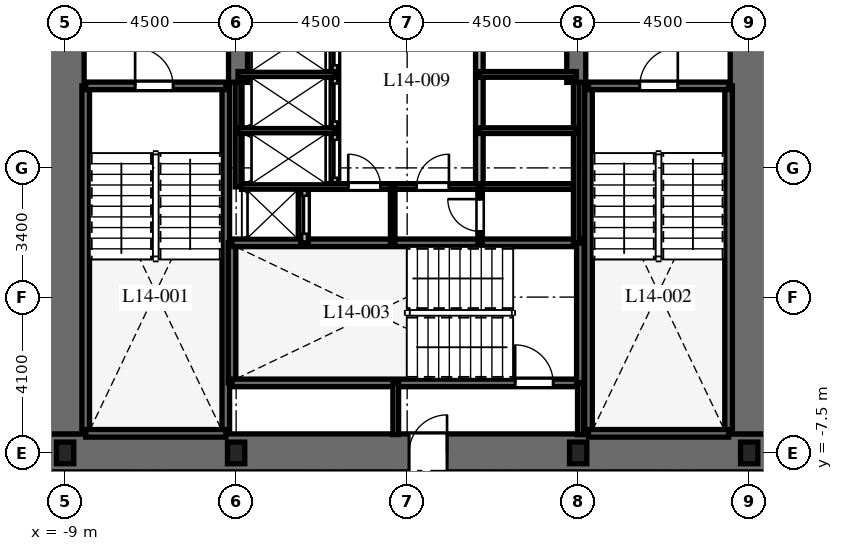
"""IFC4 building model, lengths in metres.
Left out: names, types, materials, properties, quantities, classifications, styles, units other than length and angle.
Written with IfcOpenShell. Run it as: python <this file> out.ifc"""

import sys

from ifc_helpers import new_model, si_unit, direction, frame, frame_2d, origin, origin_2d, place, context, subcontext, project, spatial, rectangle, i_section, extrude, element, fill, save


model = new_model("IFC4")
c1 = context("Model", 3, precision=1e-05, world=origin(), true_north=direction((0.0, 1.0)))
c2 = subcontext(c1, "Body", "Model", "MODEL_VIEW")
j1 = project(units=[si_unit("LENGTHUNIT", "METRE"), si_unit("PLANEANGLEUNIT", "RADIAN")], contexts=[c1])
p1 = place(None, origin())
s1 = spatial("IfcSite", under=j1, at=p1, CompositionType="ELEMENT")
p2 = place(p1, origin())
s2 = spatial("IfcBuilding", under=s1, at=p2, CompositionType="ELEMENT")
p3 = place(p2, frame((0.0, 0.0, 63.8)))
s3 = spatial("IfcBuildingStorey", under=s2, at=p3, CompositionType="ELEMENT", Elevation=63.8)
p4 = place(p3, frame((-9.5, -7.5, 0.0), z_axis=(0.0, 0.0, 1.0), x_axis=(1.0, 0.0, 0.0)))
e1 = element("IfcWall", 1, at=p4, inside=s3, PredefinedType="SHEAR", context=c2, shape_type="SweptSolid", body=[
    extrude(rectangle(XDim=19.0, YDim=1.0, at=frame_2d((9.5, 0.0))), origin(), (0.0, 0.0, 1.0), 3.7),
])
p5 = place(p4, frame((9.55, 0.0, 0.0)))
e2 = element("IfcOpeningElement", 2, at=p5, cuts=e1, PredefinedType="OPENING", context=c2, shape_type="SweptSolid", body=[
    extrude(rectangle(XDim=1.0, YDim=2.15, at=frame_2d((0.5, 1.075))), frame((0.0, 0.51, 0.0), z_axis=(0.0, -1.0, 0.0), x_axis=(1.0, 0.0, 0.0)), (0.0, 0.0, 1.0), 1.02),
])
p6 = place(p3, frame((-9.0, -7.0, 0.0), z_axis=(0.0, 0.0, 1.0), x_axis=(0.0, 1.0, 0.0)))
e3 = element("IfcWall", 3, at=p6, inside=s3, PredefinedType="SHEAR", context=c2, shape_type="SweptSolid", body=[
    extrude(rectangle(XDim=14.0, YDim=1.0, at=frame_2d((7.0, 0.0))), origin(), (0.0, 0.0, 1.0), 3.7),
])
p7 = place(p6, frame((10.125, 0.0, 0.0)))
e4 = element("IfcOpeningElement", 4, at=p7, cuts=e3, PredefinedType="OPENING", context=c2, shape_type="SweptSolid", body=[
    extrude(rectangle(XDim=1.05, YDim=2.15, at=frame_2d((0.525, 1.075))), frame((0.0, 0.51, 0.0), z_axis=(0.0, -1.0, 0.0), x_axis=(1.0, 0.0, 0.0)), (0.0, 0.0, 1.0), 1.02),
])
p8 = place(p3, frame((9.0, -7.0, 0.0), z_axis=(0.0, 0.0, 1.0), x_axis=(0.0, 1.0, 0.0)))
e5 = element("IfcWall", 5, at=p8, inside=s3, PredefinedType="SHEAR", context=c2, shape_type="SweptSolid", body=[
    extrude(rectangle(XDim=14.0, YDim=1.0, at=frame_2d((7.0, 0.0))), origin(), (0.0, 0.0, 1.0), 3.7),
])
p9 = place(p8, frame((10.125, 0.0, 0.0)))
e6 = element("IfcOpeningElement", 6, at=p9, cuts=e5, PredefinedType="OPENING", context=c2, shape_type="SweptSolid", body=[
    extrude(rectangle(XDim=1.05, YDim=2.15, at=frame_2d((0.525, 1.075))), frame((0.0, 0.51, 0.0), z_axis=(0.0, -1.0, 0.0), x_axis=(1.0, 0.0, 0.0)), (0.0, 0.0, 1.0), 1.02),
])
for number, where, z_axis, x_axis in (
    (7, (-4.45, 2.25, 0.0), (0.0, 0.0, 1.0), (0.0, 1.0, 0.0)),
    (8, (4.45, 2.25, 0.0), (0.0, 0.0, 1.0), (0.0, 1.0, 0.0)),
):
    element("IfcWall", number, at=place(p3, frame(where, z_axis=z_axis, x_axis=x_axis)), inside=s3, PredefinedType="SHEAR", context=c2, shape_type="SweptSolid", body=[
        extrude(rectangle(XDim=4.75, YDim=0.5, at=frame_2d((2.375, 0.0))), origin(), (0.0, 0.0, 1.0), 3.7),
    ])
for number, where, z_axis, x_axis in (
    (9, (-8.458, -6.985, 0.0), (0.0, 0.0, 1.0), (0.0, 1.0, 0.0)),
    (10, (-4.772, -6.985, 0.0), (0.0, 0.0, 1.0), (0.0, 1.0, 0.0)),
):
    element("IfcWall", number, at=place(p3, frame(where, z_axis=z_axis, x_axis=x_axis)), inside=s3, PredefinedType="SHEAR", context=c2, shape_type="SweptSolid", body=[
        extrude(rectangle(XDim=9.143, YDim=0.2, at=frame_2d((4.572, 0.0))), origin(), (0.0, 0.0, 1.0), 3.7),
    ])
p10 = place(p3, frame((-8.458, -6.985, 0.0), z_axis=(0.0, 0.0, 1.0), x_axis=(1.0, 0.0, 0.0)))
e11 = element("IfcWall", 11, at=p10, inside=s3, PredefinedType="SHEAR", context=c2, shape_type="SweptSolid", body=[
    extrude(rectangle(XDim=3.686, YDim=0.2, at=frame_2d((1.843, 0.0))), origin(), (0.0, 0.0, 1.0), 3.7),
])
p11 = place(p3, frame((-8.458, 2.158, 0.0), z_axis=(0.0, 0.0, 1.0), x_axis=(1.0, 0.0, 0.0)))
e12 = element("IfcWall", 12, at=p11, inside=s3, PredefinedType="SHEAR", context=c2, shape_type="SweptSolid", body=[
    extrude(rectangle(XDim=3.686, YDim=0.2, at=frame_2d((1.843, 0.0))), origin(), (0.0, 0.0, 1.0), 3.7),
])
p12 = place(p11, frame((1.3, 0.0, 0.0)))
e13 = element("IfcOpeningElement", 13, at=p12, cuts=e12, PredefinedType="OPENING", context=c2, shape_type="SweptSolid", body=[
    extrude(rectangle(XDim=1.0, YDim=2.15, at=frame_2d((0.5, 1.075))), frame((0.0, 0.11, 0.0), z_axis=(0.0, -1.0, 0.0), x_axis=(1.0, 0.0, 0.0)), (0.0, 0.0, 1.0), 0.22),
])
for number, where, z_axis, x_axis in (
    (14, (4.772, -6.985, 0.0), (0.0, 0.0, 1.0), (0.0, 1.0, 0.0)),
    (15, (8.458, -6.985, 0.0), (0.0, 0.0, 1.0), (0.0, 1.0, 0.0)),
):
    element("IfcWall", number, at=place(p3, frame(where, z_axis=z_axis, x_axis=x_axis)), inside=s3, PredefinedType="SHEAR", context=c2, shape_type="SweptSolid", body=[
        extrude(rectangle(XDim=9.143, YDim=0.2, at=frame_2d((4.572, 0.0))), origin(), (0.0, 0.0, 1.0), 3.7),
    ])
p13 = place(p3, frame((4.772, -6.985, 0.0), z_axis=(0.0, 0.0, 1.0), x_axis=(1.0, 0.0, 0.0)))
e16 = element("IfcWall", 16, at=p13, inside=s3, PredefinedType="SHEAR", context=c2, shape_type="SweptSolid", body=[
    extrude(rectangle(XDim=3.686, YDim=0.2, at=frame_2d((1.843, 0.0))), origin(), (0.0, 0.0, 1.0), 3.7),
])
p14 = place(p3, frame((4.772, 2.158, 0.0), z_axis=(0.0, 0.0, 1.0), x_axis=(1.0, 0.0, 0.0)))
e17 = element("IfcWall", 17, at=p14, inside=s3, PredefinedType="SHEAR", context=c2, shape_type="SweptSolid", body=[
    extrude(rectangle(XDim=3.686, YDim=0.2, at=frame_2d((1.843, 0.0))), origin(), (0.0, 0.0, 1.0), 3.7),
])
p15 = place(p14, frame((1.35, 0.0, 0.0)))
e18 = element("IfcOpeningElement", 18, at=p15, cuts=e17, PredefinedType="OPENING", context=c2, shape_type="SweptSolid", body=[
    extrude(rectangle(XDim=1.0, YDim=2.15, at=frame_2d((0.5, 1.075))), frame((0.0, 0.11, 0.0), z_axis=(0.0, -1.0, 0.0), x_axis=(1.0, 0.0, 0.0)), (0.0, 0.0, 1.0), 0.22),
])
p16 = place(p3, frame((-4.608, -5.658, 0.0), z_axis=(0.0, 0.0, 1.0), x_axis=(0.0, 1.0, 0.0)))
e19 = element("IfcWall", 19, at=p16, inside=s3, PredefinedType="SHEAR", context=c2, shape_type="SweptSolid", body=[
    extrude(rectangle(XDim=3.686, YDim=0.2, at=frame_2d((1.843, 0.0))), origin(), (0.0, 0.0, 1.0), 3.7),
])
p17 = place(p3, frame((-4.608, -5.658, 0.0), z_axis=(0.0, 0.0, 1.0), x_axis=(1.0, 0.0, 0.0)))
e20 = element("IfcWall", 20, at=p17, inside=s3, PredefinedType="SHEAR", context=c2, shape_type="SweptSolid", body=[
    extrude(rectangle(XDim=9.166, YDim=0.2, at=frame_2d((4.583, 0.0))), origin(), (0.0, 0.0, 1.0), 3.7),
])
p18 = place(p17, frame((7.45, 0.0, 0.0)))
e21 = element("IfcOpeningElement", 21, at=p18, cuts=e20, PredefinedType="OPENING", context=c2, shape_type="SweptSolid", body=[
    extrude(rectangle(XDim=1.0, YDim=2.15, at=frame_2d((0.5, 1.075))), frame((0.0, 0.11, 0.0), z_axis=(0.0, -1.0, 0.0), x_axis=(1.0, 0.0, 0.0)), (0.0, 0.0, 1.0), 0.22),
])
p19 = place(p3, frame((-4.608, -1.972, 0.0), z_axis=(0.0, 0.0, 1.0), x_axis=(1.0, 0.0, 0.0)))
e22 = element("IfcWall", 22, at=p19, inside=s3, PredefinedType="SHEAR", context=c2, shape_type="SweptSolid", body=[
    extrude(rectangle(XDim=9.166, YDim=0.2, at=frame_2d((4.583, 0.0))), origin(), (0.0, 0.0, 1.0), 3.7),
])
p20 = place(p3, frame((4.558, -5.658, 0.0), z_axis=(0.0, 0.0, 1.0), x_axis=(0.0, 1.0, 0.0)))
e23 = element("IfcWall", 23, at=p20, inside=s3, PredefinedType="SHEAR", context=c2, shape_type="SweptSolid", body=[
    extrude(rectangle(XDim=3.686, YDim=0.2, at=frame_2d((1.843, 0.0))), origin(), (0.0, 0.0, 1.0), 3.7),
])
for number, where, z_axis, x_axis in (
    (24, (-9.0, -7.5, 0.0), (0.0, 0.0, 1.0), (1.0, 0.0, 0.0)),
    (25, (-4.5, -7.5, 0.0), (0.0, 0.0, 1.0), (1.0, 0.0, 0.0)),
    (26, (4.5, -7.5, 0.0), (0.0, 0.0, 1.0), (1.0, 0.0, 0.0)),
    (27, (9.0, -7.5, 0.0), (0.0, 0.0, 1.0), (1.0, 0.0, 0.0)),
):
    element("IfcColumn", number, at=place(p3, frame(where, z_axis=z_axis, x_axis=x_axis)), inside=s3, PredefinedType="COLUMN", context=c2, shape_type="SweptSolid", body=[
        extrude(i_section(OverallWidth=0.454, OverallDepth=0.569, WebThickness=0.078, FlangeThickness=0.125, at=origin_2d()), origin(), (0.0, 0.0, 1.0), 3.7),
    ])
for number, where, z_axis, x_axis in (
    (28, (-0.3, -7.02, 0.0), (0.0, 0.0, 1.0), (0.0, 1.0, 0.0)),
    (29, (4.558, -7.02, 0.0), (0.0, 0.0, 1.0), (0.0, 1.0, 0.0)),
):
    element("IfcWall", number, at=place(p3, frame(where, z_axis=z_axis, x_axis=x_axis)), inside=s3, PredefinedType="PARTITIONING", context=c2, shape_type="SweptSolid", body=[
        extrude(rectangle(XDim=1.362, YDim=0.15, at=frame_2d((0.681, 0.0))), origin(), (0.0, 0.0, 1.0), 3.4),
    ])
p21 = place(p3, frame((-2.7, -1.972, 0.0), z_axis=(0.0, 0.0, 1.0), x_axis=(0.0, 1.0, 0.0)))
e30 = element("IfcWall", 30, at=p21, inside=s3, PredefinedType="PARTITIONING", context=c2, shape_type="SweptSolid", body=[
    extrude(rectangle(XDim=1.472, YDim=0.2, at=frame_2d((0.736, 0.0))), origin(), (0.0, 0.0, 1.0), 3.4),
])
p22 = place(p21, frame((0.24, 0.0, 0.0)))
e31 = element("IfcOpeningElement", 31, at=p22, cuts=e30, PredefinedType="OPENING", context=c2, shape_type="SweptSolid", body=[
    extrude(rectangle(XDim=1.0, YDim=2.2, at=frame_2d((0.5, 1.1))), frame((0.0, 0.11, 0.0), z_axis=(0.0, -1.0, 0.0), x_axis=(1.0, 0.0, 0.0)), (0.0, 0.0, 1.0), 0.22),
])
p23 = place(p3, frame((-4.45, -0.5, 0.0), z_axis=(0.0, 0.0, 1.0), x_axis=(0.0, 1.0, 0.0)))
e32 = element("IfcWall", 32, at=p23, inside=s3, PredefinedType="PARTITIONING", context=c2, shape_type="SweptSolid", body=[
    extrude(rectangle(XDim=2.75, YDim=0.15, at=frame_2d((1.375, 0.0))), origin(), (0.0, 0.0, 1.0), 3.4),
])
p24 = place(p3, frame((4.45, -1.972, 0.0), z_axis=(0.0, 0.0, 1.0), x_axis=(0.0, 1.0, 0.0)))
e33 = element("IfcWall", 33, at=p24, inside=s3, PredefinedType="PARTITIONING", context=c2, shape_type="SweptSolid", body=[
    extrude(rectangle(XDim=4.222, YDim=0.15, at=frame_2d((2.111, 0.0))), origin(), (0.0, 0.0, 1.0), 3.4),
])
p25 = place(p3, frame((-1.9, -0.5, 0.0), z_axis=(0.0, 0.0, 1.0), x_axis=(0.0, 1.0, 0.0)))
e34 = element("IfcWall", 34, at=p25, inside=s3, PredefinedType="PARTITIONING", context=c2, shape_type="SweptSolid", body=[
    extrude(rectangle(XDim=4.44, YDim=0.2, at=frame_2d((2.22, 0.0))), origin(), (0.0, 0.0, 1.0), 3.4),
])
p26 = place(p25, frame((0.24, 0.0, 0.0)))
e35 = element("IfcOpeningElement", 35, at=p26, cuts=e34, PredefinedType="OPENING", context=c2, shape_type="SweptSolid", body=[
    extrude(rectangle(XDim=1.0, YDim=2.2, at=frame_2d((0.5, 1.1))), frame((0.0, 0.11, 0.0), z_axis=(0.0, -1.0, 0.0), x_axis=(1.0, 0.0, 0.0)), (0.0, 0.0, 1.0), 0.22),
])
p27 = place(p25, frame((1.72, 0.0, 0.0)))
e36 = element("IfcOpeningElement", 36, at=p27, cuts=e34, PredefinedType="OPENING", context=c2, shape_type="SweptSolid", body=[
    extrude(rectangle(XDim=1.0, YDim=2.2, at=frame_2d((0.5, 1.1))), frame((0.0, 0.11, 0.0), z_axis=(0.0, -1.0, 0.0), x_axis=(1.0, 0.0, 0.0)), (0.0, 0.0, 1.0), 0.22),
])
p28 = place(p25, frame((3.2, 0.0, 0.0)))
e37 = element("IfcOpeningElement", 37, at=p28, cuts=e34, PredefinedType="OPENING", context=c2, shape_type="SweptSolid", body=[
    extrude(rectangle(XDim=1.0, YDim=2.2, at=frame_2d((0.5, 1.1))), frame((0.0, 0.11, 0.0), z_axis=(0.0, -1.0, 0.0), x_axis=(1.0, 0.0, 0.0)), (0.0, 0.0, 1.0), 0.22),
])
for number, where, z_axis, x_axis in (
    (38, (-4.45, 0.98, 0.0), (0.0, 0.0, 1.0), (1.0, 0.0, 0.0)),
    (39, (-4.45, 2.46, 0.0), (0.0, 0.0, 1.0), (1.0, 0.0, 0.0)),
):
    element("IfcWall", number, at=place(p3, frame(where, z_axis=z_axis, x_axis=x_axis)), inside=s3, PredefinedType="PARTITIONING", context=c2, shape_type="SweptSolid", body=[
        extrude(rectangle(XDim=2.55, YDim=0.15, at=frame_2d((1.275, 0.0))), origin(), (0.0, 0.0, 1.0), 3.4),
    ])
p29 = place(p3, frame((1.9, -0.5, 0.0), z_axis=(0.0, 0.0, 1.0), x_axis=(0.0, 1.0, 0.0)))
e40 = element("IfcWall", 40, at=p29, inside=s3, PredefinedType="PARTITIONING", context=c2, shape_type="SweptSolid", body=[
    extrude(rectangle(XDim=4.44, YDim=0.2, at=frame_2d((2.22, 0.0))), origin(), (0.0, 0.0, 1.0), 3.4),
])
for number, where, z_axis, x_axis in (
    (41, (1.9, 0.98, 0.0), (0.0, 0.0, 1.0), (1.0, 0.0, 0.0)),
    (42, (1.9, 2.46, 0.0), (0.0, 0.0, 1.0), (1.0, 0.0, 0.0)),
):
    element("IfcWall", number, at=place(p3, frame(where, z_axis=z_axis, x_axis=x_axis)), inside=s3, PredefinedType="PARTITIONING", context=c2, shape_type="SweptSolid", body=[
        extrude(rectangle(XDim=2.55, YDim=0.15, at=frame_2d((1.275, 0.0))), origin(), (0.0, 0.0, 1.0), 3.4),
    ])
p30 = place(p3, frame((-4.36, -0.49, 0.0), z_axis=(0.0, 0.0, 1.0), x_axis=(1.0, 0.0, 0.0)))
e43 = element("IfcWall", 43, at=p30, inside=s3, PredefinedType="PARTITIONING", context=c2, shape_type="SweptSolid", body=[
    extrude(rectangle(XDim=8.72, YDim=0.15, at=frame_2d((4.36, 0.0))), origin(), (0.0, 0.0, 1.0), 3.4),
])
p31 = place(p30, frame((2.81, 0.0, 0.0)))
e44 = element("IfcOpeningElement", 44, at=p31, cuts=e43, PredefinedType="OPENING", context=c2, shape_type="SweptSolid", body=[
    extrude(rectangle(XDim=0.85, YDim=2.03, at=frame_2d((0.425, 1.015))), frame((0.0, 0.085, 0.0), z_axis=(0.0, -1.0, 0.0), x_axis=(1.0, 0.0, 0.0)), (0.0, 0.0, 1.0), 0.17),
])
p32 = place(p30, frame((4.61, 0.0, 0.0)))
e45 = element("IfcOpeningElement", 45, at=p32, cuts=e43, PredefinedType="OPENING", context=c2, shape_type="SweptSolid", body=[
    extrude(rectangle(XDim=0.85, YDim=2.03, at=frame_2d((0.425, 1.015))), frame((0.0, 0.085, 0.0), z_axis=(0.0, -1.0, 0.0), x_axis=(1.0, 0.0, 0.0)), (0.0, 0.0, 1.0), 0.17),
])
p33 = place(p3, frame((-0.38, -1.972, 0.0), z_axis=(0.0, 0.0, 1.0), x_axis=(0.0, 1.0, 0.0)))
e46 = element("IfcWall", 46, at=p33, inside=s3, PredefinedType="PARTITIONING", context=c2, shape_type="SweptSolid", body=[
    extrude(rectangle(XDim=1.472, YDim=0.12, at=frame_2d((0.736, 0.0))), origin(), (0.0, 0.0, 1.0), 3.4),
])
p34 = place(p3, frame((1.92, -1.972, 0.0), z_axis=(0.0, 0.0, 1.0), x_axis=(0.0, 1.0, 0.0)))
e47 = element("IfcWall", 47, at=p34, inside=s3, PredefinedType="PARTITIONING", context=c2, shape_type="SweptSolid", body=[
    extrude(rectangle(XDim=1.472, YDim=0.12, at=frame_2d((0.736, 0.0))), origin(), (0.0, 0.0, 1.0), 3.4),
])
p35 = place(p34, frame((0.3, 0.0, 0.0)))
e48 = element("IfcOpeningElement", 48, at=p35, cuts=e47, PredefinedType="OPENING", context=c2, shape_type="SweptSolid", body=[
    extrude(rectangle(XDim=0.85, YDim=2.03, at=frame_2d((0.425, 1.015))), frame((0.0, 0.07, 0.0), z_axis=(0.0, -1.0, 0.0), x_axis=(1.0, 0.0, 0.0)), (0.0, 0.0, 1.0), 0.14),
])
p36 = place(p12, origin())
e49 = element("IfcDoor", 49, at=p36, inside=s3, OperationType="SINGLE_SWING_LEFT", PredefinedType="DOOR", context=c2, shape_type="SweptSolid", body=[
    extrude(rectangle(XDim=1.0, YDim=2.15, at=frame_2d((0.5, 1.075))), frame((0.0, 0.025, 0.0), z_axis=(0.0, -1.0, 0.0), x_axis=(1.0, 0.0, 0.0)), (0.0, 0.0, 1.0), 0.05),
])
fill(e13, e49)
p37 = place(p15, origin())
e50 = element("IfcDoor", 50, at=p37, inside=s3, OperationType="SINGLE_SWING_RIGHT", PredefinedType="DOOR", context=c2, shape_type="SweptSolid", body=[
    extrude(rectangle(XDim=1.0, YDim=2.15, at=frame_2d((0.5, 1.075))), frame((0.0, 0.025, 0.0), z_axis=(0.0, -1.0, 0.0), x_axis=(1.0, 0.0, 0.0)), (0.0, 0.0, 1.0), 0.05),
])
fill(e18, e50)
p38 = place(p18, origin())
e51 = element("IfcDoor", 51, at=p38, inside=s3, OperationType="SINGLE_SWING_LEFT", PredefinedType="DOOR", context=c2, shape_type="SweptSolid", body=[
    extrude(rectangle(XDim=1.0, YDim=2.15, at=frame_2d((0.5, 1.075))), frame((0.0, 0.025, 0.0), z_axis=(0.0, -1.0, 0.0), x_axis=(1.0, 0.0, 0.0)), (0.0, 0.0, 1.0), 0.05),
])
fill(e21, e51)
p39 = place(p5, origin())
e52 = element("IfcDoor", 52, at=p39, inside=s3, OperationType="SINGLE_SWING_RIGHT", PredefinedType="DOOR", context=c2, shape_type="SweptSolid", body=[
    extrude(rectangle(XDim=1.0, YDim=2.15, at=frame_2d((0.5, 1.075))), frame((0.0, 0.025, 0.0), z_axis=(0.0, -1.0, 0.0), x_axis=(1.0, 0.0, 0.0)), (0.0, 0.0, 1.0), 0.05),
])
fill(e2, e52)
p40 = place(p22, origin())
e53 = element("IfcDoor", 53, at=p40, inside=s3, OperationType="SLIDING_TO_LEFT", PredefinedType="DOOR", context=c2, shape_type="SweptSolid", body=[
    extrude(rectangle(XDim=1.0, YDim=2.2, at=frame_2d((0.5, 1.1))), frame((0.0, 0.025, 0.0), z_axis=(0.0, -1.0, 0.0), x_axis=(1.0, 0.0, 0.0)), (0.0, 0.0, 1.0), 0.05),
])
fill(e31, e53)
p41 = place(p26, origin())
e54 = element("IfcDoor", 54, at=p41, inside=s3, OperationType="SLIDING_TO_LEFT", PredefinedType="DOOR", context=c2, shape_type="SweptSolid", body=[
    extrude(rectangle(XDim=1.0, YDim=2.2, at=frame_2d((0.5, 1.1))), frame((0.0, 0.025, 0.0), z_axis=(0.0, -1.0, 0.0), x_axis=(1.0, 0.0, 0.0)), (0.0, 0.0, 1.0), 0.05),
])
fill(e35, e54)
p42 = place(p27, origin())
e55 = element("IfcDoor", 55, at=p42, inside=s3, OperationType="SLIDING_TO_LEFT", PredefinedType="DOOR", context=c2, shape_type="SweptSolid", body=[
    extrude(rectangle(XDim=1.0, YDim=2.2, at=frame_2d((0.5, 1.1))), frame((0.0, 0.025, 0.0), z_axis=(0.0, -1.0, 0.0), x_axis=(1.0, 0.0, 0.0)), (0.0, 0.0, 1.0), 0.05),
])
fill(e36, e55)
p43 = place(p28, origin())
e56 = element("IfcDoor", 56, at=p43, inside=s3, OperationType="SLIDING_TO_LEFT", PredefinedType="DOOR", context=c2, shape_type="SweptSolid", body=[
    extrude(rectangle(XDim=1.0, YDim=2.2, at=frame_2d((0.5, 1.1))), frame((0.0, 0.025, 0.0), z_axis=(0.0, -1.0, 0.0), x_axis=(1.0, 0.0, 0.0)), (0.0, 0.0, 1.0), 0.05),
])
fill(e37, e56)
p44 = place(p31, origin())
e57 = element("IfcDoor", 57, at=p44, inside=s3, OperationType="SINGLE_SWING_LEFT", PredefinedType="DOOR", context=c2, shape_type="SweptSolid", body=[
    extrude(rectangle(XDim=0.85, YDim=2.03, at=frame_2d((0.425, 1.015))), frame((0.0, 0.025, 0.0), z_axis=(0.0, -1.0, 0.0), x_axis=(1.0, 0.0, 0.0)), (0.0, 0.0, 1.0), 0.05),
])
fill(e44, e57)
p45 = place(p32, origin())
e58 = element("IfcDoor", 58, at=p45, inside=s3, OperationType="SINGLE_SWING_RIGHT", PredefinedType="DOOR", context=c2, shape_type="SweptSolid", body=[
    extrude(rectangle(XDim=0.85, YDim=2.03, at=frame_2d((0.425, 1.015))), frame((0.0, 0.025, 0.0), z_axis=(0.0, -1.0, 0.0), x_axis=(1.0, 0.0, 0.0)), (0.0, 0.0, 1.0), 0.05),
])
fill(e45, e58)
p46 = place(p35, origin())
e59 = element("IfcDoor", 59, at=p46, inside=s3, OperationType="SINGLE_SWING_RIGHT", PredefinedType="DOOR", context=c2, shape_type="SweptSolid", body=[
    extrude(rectangle(XDim=0.85, YDim=2.03, at=frame_2d((0.425, 1.015))), frame((0.0, 0.025, 0.0), z_axis=(0.0, -1.0, 0.0), x_axis=(1.0, 0.0, 0.0)), (0.0, 0.0, 1.0), 0.05),
])
fill(e48, e59)
save(model, sys.argv[1])
